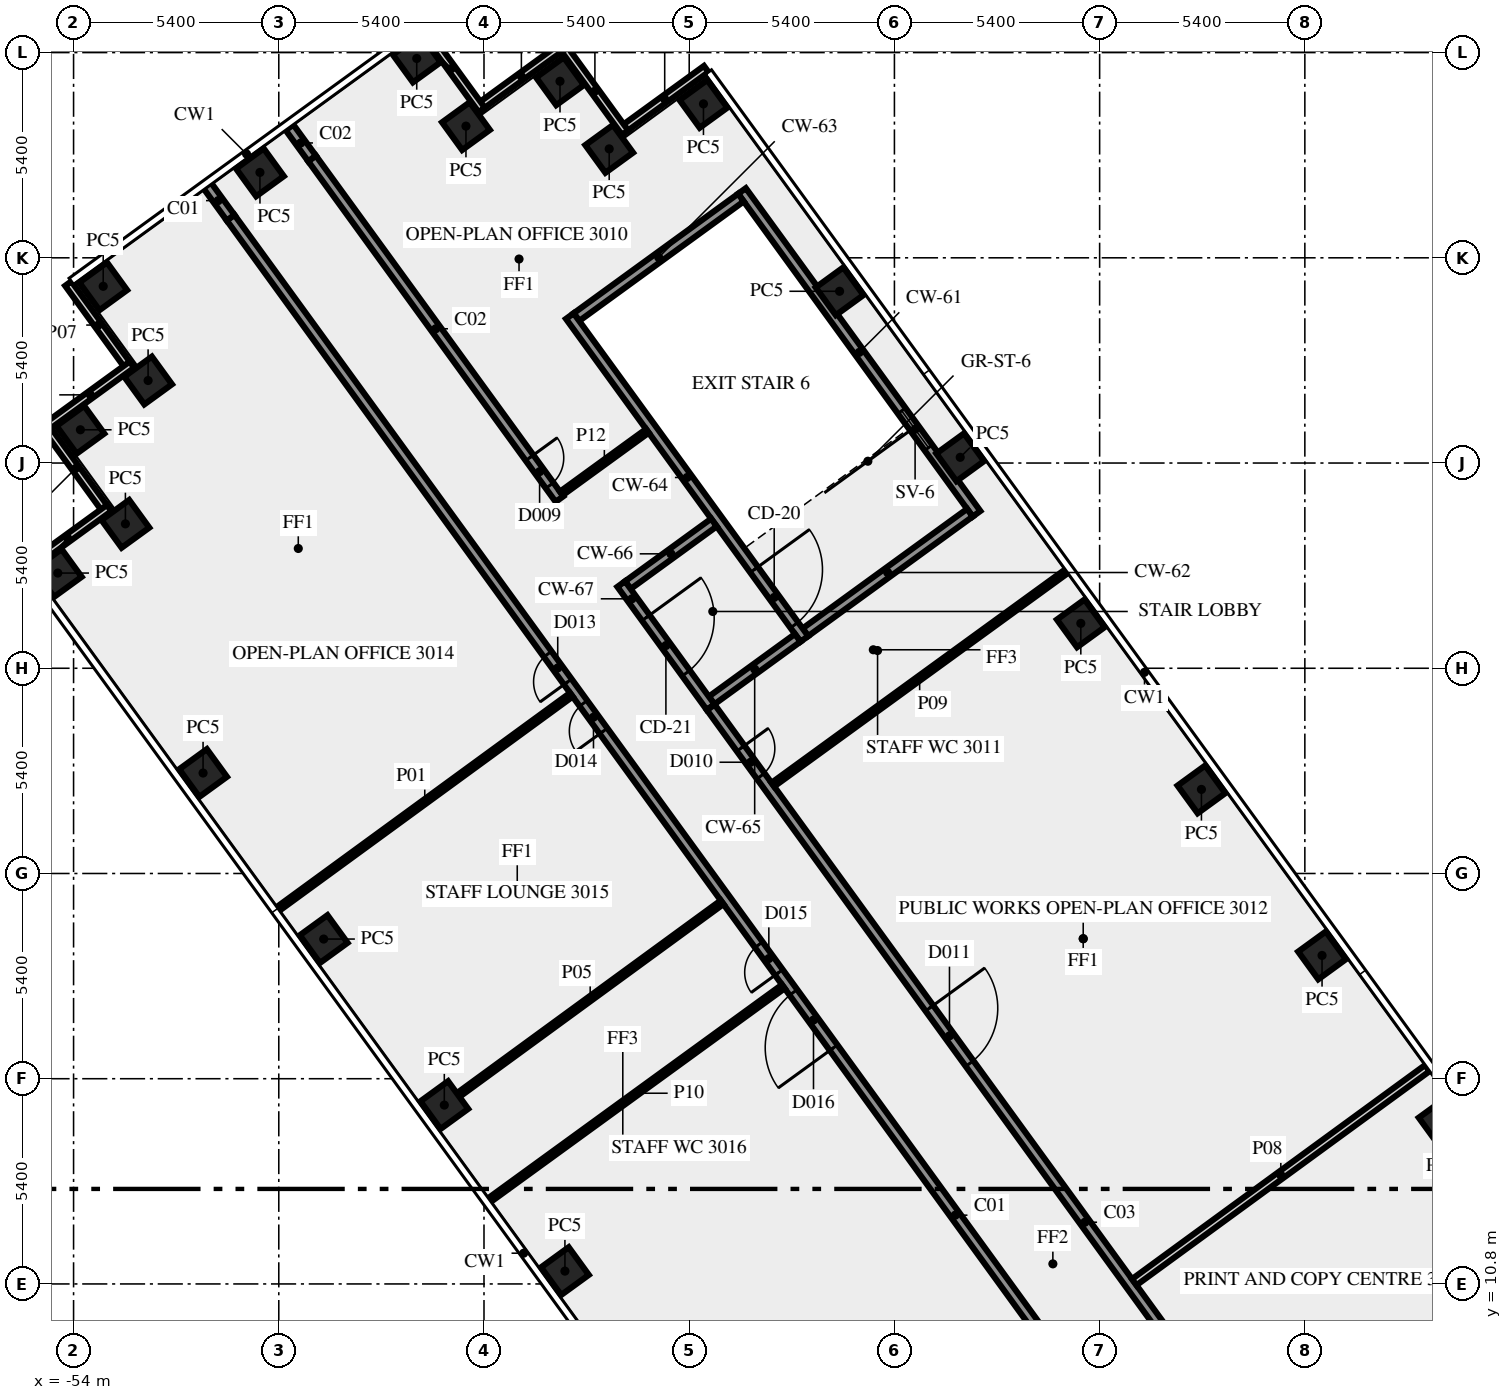
"""IFC4 building model, lengths in metres.
Left out: names, types, materials, properties, quantities, classifications, styles, units other than length and angle.
Written with IfcOpenShell. Run it as: python <this file> out.ifc"""

import sys

from ifc_helpers import new_model, si_unit, direction, frame, frame_2d, origin, origin_2d, place, context, subcontext, project, spatial, rectangle, extrude, element, fill, save


model = new_model("IFC4")
c1 = context("Model", 3, precision=1e-05, world=origin(), true_north=direction((0.0, 1.0)))
c2 = subcontext(c1, "Body", "Model", "MODEL_VIEW")
j1 = project(units=[si_unit("LENGTHUNIT", "METRE"), si_unit("PLANEANGLEUNIT", "RADIAN")], contexts=[c1])
p1 = place(None, origin())
s1 = spatial("IfcSite", under=j1, at=p1, CompositionType="ELEMENT")
p2 = place(p1, origin())
s2 = spatial("IfcBuilding", under=s1, at=p2, CompositionType="ELEMENT")
p3 = place(p2, frame((0.0, 0.0, 129.0)))
s3 = spatial("IfcBuildingStorey", under=s2, at=p3, CompositionType="ELEMENT", Elevation=129.0)
for number, where, z_axis, x_axis in (
    (1, (-17.974, 15.075, 0.0), (0.0, 0.0, 1.0), (-0.588, 0.809, 0.0)),
    (2, (-21.147, 19.444, 0.0), (0.0, 0.0, 1.0), (-0.588, 0.809, 0.0)),
    (3, (-24.321, 23.812, 0.0), (0.0, 0.0, 1.0), (-0.588, 0.809, 0.0)),
    (4, (-27.495, 28.181, 0.0), (0.0, 0.0, 1.0), (-0.588, 0.809, 0.0)),
    (5, (-30.669, 32.55, 0.0), (0.0, 0.0, 1.0), (-0.588, 0.809, 0.0)),
    (6, (-33.843, 36.919, 0.0), (0.0, 0.0, 1.0), (-0.588, 0.809, 0.0)),
    (7, (-37.425, 41.85, 0.0), (0.0, 0.0, 1.0), (-0.588, 0.809, 0.0)),
    (8, (-39.906, 40.666, 0.0), (0.0, 0.0, 1.0), (-0.588, 0.809, 0.0)),
    (9, (-41.2, 42.445, 0.0), (0.0, 0.0, 1.0), (-0.588, 0.809, 0.0)),
    (10, (-43.675, 41.265, 0.0), (0.0, 0.0, 1.0), (-0.809, -0.588, 0.0)),
    (11, (-44.97, 43.045, 0.0), (0.0, 0.0, 1.0), (-0.809, -0.588, 0.0)),
    (12, (-49.096, 40.047, 0.0), (0.0, 0.0, 1.0), (-0.809, -0.588, 0.0)),
    (13, (-53.22, 37.05, 0.0), (0.0, 0.0, 1.0), (0.588, -0.809, 0.0)),
    (14, (-52.039, 34.571, 0.0), (0.0, 0.0, 1.0), (-0.809, -0.588, 0.0)),
    (15, (-53.82, 33.275, 0.0), (0.0, 0.0, 1.0), (0.588, -0.809, 0.0)),
    (16, (-52.636, 30.8, 0.0), (0.0, 0.0, 1.0), (-0.809, -0.588, 0.0)),
    (17, (-54.415, 29.505, 0.0), (0.0, 0.0, 1.0), (0.588, -0.809, 0.0)),
    (18, (-50.592, 24.243, 0.0), (0.0, 0.0, 1.0), (0.588, -0.809, 0.0)),
    (19, (-47.418, 19.875, 0.0), (0.0, 0.0, 1.0), (0.588, -0.809, 0.0)),
    (20, (-44.244, 15.506, 0.0), (0.0, 0.0, 1.0), (0.588, -0.809, 0.0)),
    (21, (-41.07, 11.137, 0.0), (0.0, 0.0, 1.0), (0.588, -0.809, 0.0)),
):
    element("IfcColumn", number, at=place(p3, frame(where, z_axis=z_axis, x_axis=x_axis)), inside=s3, PredefinedType="COLUMN", context=c2, shape_type="SweptSolid", body=[
        extrude(rectangle(XDim=0.9, YDim=0.9, at=origin_2d()), origin(), (0.0, 0.0, 1.0), 3.4),
    ])
p4 = place(p3, frame((-37.353, 42.768, 0.0), z_axis=(0.0, 0.0, 1.0), x_axis=(-0.809033161865, -0.587762999008, 0.0)))
e22 = element("IfcWall", 22, at=p4, inside=s3, PredefinedType="SOLIDWALL", context=c2, shape_type="SweptSolid", body=[
    extrude(rectangle(XDim=2.7, YDim=0.2, at=frame_2d((1.35, 0.0))), origin(), (0.0, 0.0, 1.0), 3.4),
])
p5 = place(p3, frame((-39.488, 41.094, 0.0), z_axis=(0.0, 0.0, 1.0), x_axis=(-0.587806000234, 0.809001919707, 0.0)))
e23 = element("IfcWall", 23, at=p5, inside=s3, PredefinedType="SOLIDWALL", context=c2, shape_type="SweptSolid", body=[
    extrude(rectangle(XDim=2.7, YDim=0.2, at=frame_2d((1.35, 0.0))), origin(), (0.0, 0.0, 1.0), 3.4),
])
for number, where, z_axis, x_axis in (
    (24, (-41.124, 43.366, 0.0), (0.0, 0.0, 1.0), (-0.809, -0.588, 0.0)),
    (25, (-43.259, 41.691, 0.0), (0.0, 0.0, 1.0), (-0.588, 0.809, 0.0)),
    (26, (-54.14, 37.123, 0.0), (0.0, 0.0, 1.0), (0.588, -0.809, 0.0)),
    (27, (-52.465, 34.987, 0.0), (0.0, 0.0, 1.0), (-0.809, -0.588, 0.0)),
):
    element("IfcWall", number, at=place(p3, frame(where, z_axis=z_axis, x_axis=x_axis)), inside=s3, PredefinedType="SOLIDWALL", context=c2, shape_type="SweptSolid", body=[
        extrude(rectangle(XDim=2.7, YDim=0.2, at=frame_2d((1.35, 0.0))), origin(), (0.0, 0.0, 1.0), 3.4),
    ])
p6 = place(p3, frame((-54.738, 33.351, 0.0), z_axis=(0.0, 0.0, 1.0), x_axis=(0.587779184282, -0.809021403008, 0.0)))
e28 = element("IfcWall", 28, at=p6, inside=s3, PredefinedType="SOLIDWALL", context=c2, shape_type="SweptSolid", body=[
    extrude(rectangle(XDim=2.7, YDim=0.2, at=frame_2d((1.35, 0.0))), origin(), (0.0, 0.0, 1.0), 3.4),
])
p7 = place(p3, frame((-53.063, 31.216, 0.0), z_axis=(0.0, 0.0, 1.0), x_axis=(-0.809033161865, -0.587762999008, 0.0)))
e29 = element("IfcWall", 29, at=p7, inside=s3, PredefinedType="SOLIDWALL", context=c2, shape_type="SweptSolid", body=[
    extrude(rectangle(XDim=2.7, YDim=0.2, at=frame_2d((1.35, 0.0))), origin(), (0.0, 0.0, 1.0), 3.4),
])
p8 = place(p3, frame((-30.24, 31.064, 0.0), z_axis=(0.0, 0.0, 1.0), x_axis=(-0.587795589702, 0.809009483706, 0.0)))
e30 = element("IfcWall", 30, at=p8, inside=s3, PredefinedType="SHEAR", context=c2, shape_type="SweptSolid", body=[
    extrude(rectangle(XDim=10.5, YDim=0.25, at=frame_2d((5.25, 0.0))), origin(), (0.0, 0.0, 1.0), 3.4),
])
p9 = place(p8, frame((2.15, 0.0, 1.0)))
e31 = element("IfcOpeningElement", 31, at=p9, cuts=e30, PredefinedType="OPENING", context=c2, shape_type="SweptSolid", body=[
    extrude(rectangle(XDim=1.2, YDim=1.2, at=frame_2d((0.6, 0.6))), frame((0.0, 0.135, 0.0), z_axis=(0.0, -1.0, 0.0), x_axis=(1.0, 0.0, 0.0)), (0.0, 0.0, 1.0), 0.27),
])
p10 = place(p3, frame((-30.414, 31.092, 0.0), z_axis=(0.0, 0.0, 1.0), x_axis=(-0.8089984606, -0.587810760999, 0.0)))
e32 = element("IfcWall", 32, at=p10, inside=s3, PredefinedType="SHEAR", context=c2, shape_type="SweptSolid", body=[
    extrude(rectangle(XDim=5.35, YDim=0.25, at=frame_2d((2.675, 0.0))), origin(), (0.0, 0.0, 1.0), 3.4),
])
p11 = place(p3, frame((-36.439, 39.384, 0.0), z_axis=(0.0, 0.0, 1.0), x_axis=(-0.809020161303, -0.587780893365, 0.0)))
e33 = element("IfcWall", 33, at=p11, inside=s3, PredefinedType="SHEAR", context=c2, shape_type="SweptSolid", body=[
    extrude(rectangle(XDim=5.35, YDim=0.25, at=frame_2d((2.675, 0.0))), origin(), (0.0, 0.0, 1.0), 3.4),
])
p12 = place(p3, frame((-40.942, 36.267, 0.0), z_axis=(0.0, 0.0, 1.0), x_axis=(0.587795589702, -0.809009483706, 0.0)))
e34 = element("IfcWall", 34, at=p12, inside=s3, PredefinedType="SHEAR", context=c2, shape_type="SweptSolid", body=[
    extrude(rectangle(XDim=10.5, YDim=0.25, at=frame_2d((5.25, 0.0))), origin(), (0.0, 0.0, 1.0), 3.4),
])
p13 = place(p12, frame((8.25, 0.0, 0.0)))
e35 = element("IfcOpeningElement", 35, at=p13, cuts=e34, PredefinedType="OPENING", context=c2, shape_type="SweptSolid", body=[
    extrude(rectangle(XDim=1.8, YDim=2.1, at=frame_2d((0.9, 1.05))), frame((0.0, 0.135, 0.0), z_axis=(0.0, -1.0, 0.0), x_axis=(1.0, 0.0, 0.0)), (0.0, 0.0, 1.0), 0.27),
])
for number, where, z_axis, x_axis in (
    (36, (-34.945, 27.8, 0.0), (0.0, 0.0, 1.0), (-0.809, -0.588, 0.0)),
    (37, (-37.149, 30.834, 0.0), (0.0, 0.0, 1.0), (-0.809, -0.588, 0.0)),
):
    element("IfcWall", number, at=place(p3, frame(where, z_axis=z_axis, x_axis=x_axis)), inside=s3, PredefinedType="SHEAR", context=c2, shape_type="SweptSolid", body=[
        extrude(rectangle(XDim=2.8, YDim=0.25, at=frame_2d((1.4, 0.0))), origin(), (0.0, 0.0, 1.0), 3.4),
    ])
p14 = place(p3, frame((-39.589, 29.216, 0.0), z_axis=(0.0, 0.0, 1.0), x_axis=(0.587772420479, -0.809026317077, 0.0)))
e38 = element("IfcWall", 38, at=p14, inside=s3, PredefinedType="SHEAR", context=c2, shape_type="SweptSolid", body=[
    extrude(rectangle(XDim=4.0, YDim=0.25, at=frame_2d((2.0, 0.0))), origin(), (0.0, 0.0, 1.0), 3.4),
])
p15 = place(p14, frame((1.1, 0.0, 0.0)))
e39 = element("IfcOpeningElement", 39, at=p15, cuts=e38, PredefinedType="OPENING", context=c2, shape_type="SweptSolid", body=[
    extrude(rectangle(XDim=1.8, YDim=2.1, at=frame_2d((0.9, 1.05))), frame((0.0, 0.135, 0.0), z_axis=(0.0, -1.0, 0.0), x_axis=(1.0, 0.0, 0.0)), (0.0, 0.0, 1.0), 0.27),
])
p16 = place(p3, frame((-20.531, -1.523, 0.0), z_axis=(0.0, 0.0, 1.0), x_axis=(-0.587784522481, 0.809017524614, 0.0)))
e40 = element("IfcWall", 40, at=p16, inside=s3, PredefinedType="SOLIDWALL", context=c2, shape_type="SweptSolid", body=[
    extrude(rectangle(XDim=49.912, YDim=0.25, at=frame_2d((24.956, 0.0))), origin(), (0.0, 0.0, 1.0), 3.4),
])
p17 = place(p16, frame((34.816, 0.0, 0.0)))
e41 = element("IfcOpeningElement", 41, at=p17, cuts=e40, PredefinedType="OPENING", context=c2, shape_type="SweptSolid", body=[
    extrude(rectangle(XDim=0.9, YDim=2.1, at=frame_2d((0.45, 1.05))), frame((0.0, 0.135, 0.0), z_axis=(0.0, -1.0, 0.0), x_axis=(1.0, 0.0, 0.0)), (0.0, 0.0, 1.0), 0.27),
])
p18 = place(p16, frame((33.215, 0.0, 0.0)))
e42 = element("IfcOpeningElement", 42, at=p18, cuts=e40, PredefinedType="OPENING", context=c2, shape_type="SweptSolid", body=[
    extrude(rectangle(XDim=0.9, YDim=2.1, at=frame_2d((0.45, 1.05))), frame((0.0, 0.135, 0.0), z_axis=(0.0, -1.0, 0.0), x_axis=(1.0, 0.0, 0.0)), (0.0, 0.0, 1.0), 0.27),
])
p19 = place(p16, frame((22.916, 0.0, 0.0)))
e43 = element("IfcOpeningElement", 43, at=p19, cuts=e40, PredefinedType="OPENING", context=c2, shape_type="SweptSolid", body=[
    extrude(rectangle(XDim=1.8, YDim=2.1, at=frame_2d((0.9, 1.05))), frame((0.0, 0.135, 0.0), z_axis=(0.0, -1.0, 0.0), x_axis=(1.0, 0.0, 0.0)), (0.0, 0.0, 1.0), 0.27),
])
p20 = place(p16, frame((0.483, 0.0, 0.0)))
e44 = element("IfcOpeningElement", 44, at=p20, cuts=e40, PredefinedType="OPENING", context=c2, shape_type="SweptSolid", body=[
    extrude(rectangle(XDim=1.8, YDim=2.1, at=frame_2d((0.9, 1.05))), frame((0.0, 0.135, 0.0), z_axis=(0.0, -1.0, 0.0), x_axis=(1.0, 0.0, 0.0)), (0.0, 0.0, 1.0), 0.27),
])
p21 = place(p16, frame((25.365, 0.0, 0.0)))
e45 = element("IfcOpeningElement", 45, at=p21, cuts=e40, PredefinedType="OPENING", context=c2, shape_type="SweptSolid", body=[
    extrude(rectangle(XDim=0.9, YDim=2.1, at=frame_2d((0.45, 1.05))), frame((0.0, 0.135, 0.0), z_axis=(0.0, -1.0, 0.0), x_axis=(1.0, 0.0, 0.0)), (0.0, 0.0, 1.0), 0.27),
])
p22 = place(p3, frame((-47.725, 40.414, 0.0), z_axis=(0.0, 0.0, 1.0), x_axis=(0.587773291021, -0.809025684612, 0.0)))
e46 = element("IfcWall", 46, at=p22, inside=s3, PredefinedType="SOLIDWALL", context=c2, shape_type="SweptSolid", body=[
    extrude(rectangle(XDim=11.079, YDim=0.25, at=frame_2d((5.539, 0.0))), origin(), (0.0, 0.0, 1.0), 3.4),
])
p23 = place(p22, frame((9.737, 0.0, 0.0)))
e47 = element("IfcOpeningElement", 47, at=p23, cuts=e46, PredefinedType="OPENING", context=c2, shape_type="SweptSolid", body=[
    extrude(rectangle(XDim=0.9, YDim=2.1, at=frame_2d((0.45, 1.05))), frame((0.0, 0.135, 0.0), z_axis=(0.0, -1.0, 0.0), x_axis=(1.0, 0.0, 0.0)), (0.0, 0.0, 1.0), 0.27),
])
p24 = place(p3, frame((-37.232, 25.972, 0.0), z_axis=(0.0, 0.0, 1.0), x_axis=(0.587786323093, -0.809016216391, 0.0)))
e48 = element("IfcWall", 48, at=p24, inside=s3, PredefinedType="SOLIDWALL", context=c2, shape_type="SweptSolid", body=[
    extrude(rectangle(XDim=33.493, YDim=0.25, at=frame_2d((16.747, 0.0))), origin(), (0.0, 0.0, 1.0), 3.4),
])
p25 = place(p24, frame((9.785, 0.0, 0.0)))
e49 = element("IfcOpeningElement", 49, at=p25, cuts=e48, PredefinedType="OPENING", context=c2, shape_type="SweptSolid", body=[
    extrude(rectangle(XDim=1.8, YDim=2.1, at=frame_2d((0.9, 1.05))), frame((0.0, 0.135, 0.0), z_axis=(0.0, -1.0, 0.0), x_axis=(1.0, 0.0, 0.0)), (0.0, 0.0, 1.0), 0.27),
])
p26 = place(p24, frame((29.152, 0.0, 0.0)))
e50 = element("IfcOpeningElement", 50, at=p26, cuts=e48, PredefinedType="OPENING", context=c2, shape_type="SweptSolid", body=[
    extrude(rectangle(XDim=0.9, YDim=2.1, at=frame_2d((0.45, 1.05))), frame((0.0, 0.135, 0.0), z_axis=(0.0, -1.0, 0.0), x_axis=(1.0, 0.0, 0.0)), (0.0, 0.0, 1.0), 0.27),
])
p27 = place(p24, frame((1.335, 0.0, 0.0)))
e51 = element("IfcOpeningElement", 51, at=p27, cuts=e48, PredefinedType="OPENING", context=c2, shape_type="SweptSolid", body=[
    extrude(rectangle(XDim=0.9, YDim=2.1, at=frame_2d((0.45, 1.05))), frame((0.0, 0.135, 0.0), z_axis=(0.0, -1.0, 0.0), x_axis=(1.0, 0.0, 0.0)), (0.0, 0.0, 1.0), 0.27),
])
p28 = place(p3, frame((-48.615, 20.671, 0.0), z_axis=(0.0, 0.0, 1.0), x_axis=(0.807691251741, 0.589605666408, 0.0)))
e52 = element("IfcWall", 52, at=p28, inside=s3, PredefinedType="PARTITIONING", context=c2, shape_type="SweptSolid", body=[
    extrude(rectangle(XDim=9.55, YDim=0.12, at=frame_2d((4.775, 0.0))), origin(), (0.0, 0.0, 1.0), 2.5),
])
p29 = place(p3, frame((-43.876, 15.773, 0.0), z_axis=(0.0, 0.0, 1.0), x_axis=(0.807597163234, 0.589734535139, 0.0)))
e53 = element("IfcWall", 53, at=p29, inside=s3, PredefinedType="PARTITIONING", context=c2, shape_type="SweptSolid", body=[
    extrude(rectangle(XDim=8.595, YDim=0.12, at=frame_2d((4.298, 0.0))), origin(), (0.0, 0.0, 1.0), 3.4),
])
p30 = place(p3, frame((-26.089, 10.848, 0.0), z_axis=(0.0, 0.0, 1.0), x_axis=(0.807661302092, 0.589646691759, 0.0)))
e54 = element("IfcWall", 54, at=p30, inside=s3, PredefinedType="SOLIDWALL", context=c2, shape_type="SweptSolid", body=[
    extrude(rectangle(XDim=9.55, YDim=0.2, at=frame_2d((4.775, 0.0))), origin(), (0.0, 0.0, 1.0), 2.5),
])
p31 = place(p3, frame((-27.873, 29.551, 0.0), z_axis=(0.0, 0.0, 1.0), x_axis=(-0.809043311713, -0.587749027879, 0.0)))
e55 = element("IfcWall", 55, at=p31, inside=s3, PredefinedType="PARTITIONING", context=c2, shape_type="SweptSolid", body=[
    extrude(rectangle(XDim=9.55, YDim=0.12, at=frame_2d((4.775, 0.0))), origin(), (0.0, 0.0, 1.0), 2.5),
])
p32 = place(p3, frame((-35.324, 18.625, 0.0), z_axis=(0.0, 0.0, 1.0), x_axis=(-0.808998008689, -0.58781138296, 0.0)))
e56 = element("IfcWall", 56, at=p32, inside=s3, PredefinedType="PARTITIONING", context=c2, shape_type="SweptSolid", body=[
    extrude(rectangle(XDim=9.55, YDim=0.12, at=frame_2d((4.775, 0.0))), origin(), (0.0, 0.0, 1.0), 2.5),
])
p33 = place(p3, frame((-41.166, 31.599, 0.0), z_axis=(0.0, 0.0, 1.0), x_axis=(0.809090262332, 0.587684394381, 0.0)))
e57 = element("IfcWall", 57, at=p33, inside=s3, PredefinedType="PARTITIONING", context=c2, shape_type="SweptSolid", body=[
    extrude(rectangle(XDim=2.801, YDim=0.12, at=frame_2d((1.4, 0.0))), origin(), (0.0, 0.0, 1.0), 3.4),
])
p34 = place(p3, frame((-49.869, 38.856, 0.0), z_axis=(0.0, 0.0, 1.0), x_axis=(-0.587674273289, 0.809097613712, 0.0)))
e58 = element("IfcWall", 58, at=p34, inside=s3, PredefinedType="SOLIDWALL", context=c2, shape_type="SweptSolid", body=[
    extrude(rectangle(XDim=1.109, YDim=0.25, at=frame_2d((0.555, 0.0))), origin(), (0.0, 0.0, 1.0), 2.5),
])
p35 = place(p3, frame((-47.725, 40.414, 0.0), z_axis=(0.0, 0.0, 1.0), x_axis=(-0.587840411638, 0.808976915892, 0.0)))
e59 = element("IfcWall", 59, at=p35, inside=s3, PredefinedType="SOLIDWALL", context=c2, shape_type="SweptSolid", body=[
    extrude(rectangle(XDim=1.008, YDim=0.25, at=frame_2d((0.504, 0.0))), origin(), (0.0, 0.0, 1.0), 2.5),
])
p36 = place(p9, origin())
e60 = element("IfcWindow", 60, at=p36, inside=s3, PartitioningType="SINGLE_PANEL", PredefinedType="WINDOW", context=c2, shape_type="SweptSolid", body=[
    extrude(rectangle(XDim=1.2, YDim=1.2, at=frame_2d((0.6, 0.6))), frame((0.0, 0.03, 0.0), z_axis=(0.0, -1.0, 0.0), x_axis=(1.0, 0.0, 0.0)), (0.0, 0.0, 1.0), 0.06),
])
fill(e31, e60)
p37 = place(p13, origin())
e61 = element("IfcDoor", 61, at=p37, inside=s3, OperationType="DOUBLE_DOOR_SINGLE_SWING", PredefinedType="DOOR", context=c2, shape_type="SweptSolid", body=[
    extrude(rectangle(XDim=1.8, YDim=2.1, at=frame_2d((0.9, 1.05))), frame((0.0, 0.025, 0.0), z_axis=(0.0, -1.0, 0.0), x_axis=(1.0, 0.0, 0.0)), (0.0, 0.0, 1.0), 0.05),
])
fill(e35, e61)
p38 = place(p15, origin())
e62 = element("IfcDoor", 62, at=p38, inside=s3, OperationType="DOUBLE_DOOR_SINGLE_SWING", PredefinedType="DOOR", context=c2, shape_type="SweptSolid", body=[
    extrude(rectangle(XDim=1.8, YDim=2.1, at=frame_2d((0.9, 1.05))), frame((0.0, 0.025, 0.0), z_axis=(0.0, -1.0, 0.0), x_axis=(1.0, 0.0, 0.0)), (0.0, 0.0, 1.0), 0.05),
])
fill(e39, e62)
p39 = place(p23, origin())
e63 = element("IfcDoor", 63, at=p39, inside=s3, OperationType="SINGLE_SWING_RIGHT", PredefinedType="DOOR", context=c2, shape_type="SweptSolid", body=[
    extrude(rectangle(XDim=0.9, YDim=2.1, at=frame_2d((0.45, 1.05))), frame((0.0, 0.025, 0.0), z_axis=(0.0, -1.0, 0.0), x_axis=(1.0, 0.0, 0.0)), (0.0, 0.0, 1.0), 0.05),
])
fill(e47, e63)
p40 = place(p17, origin())
e64 = element("IfcDoor", 64, at=p40, inside=s3, OperationType="SINGLE_SWING_LEFT", PredefinedType="DOOR", context=c2, shape_type="SweptSolid", body=[
    extrude(rectangle(XDim=0.9, YDim=2.1, at=frame_2d((0.45, 1.05))), frame((0.0, 0.025, 0.0), z_axis=(0.0, -1.0, 0.0), x_axis=(1.0, 0.0, 0.0)), (0.0, 0.0, 1.0), 0.05),
])
fill(e41, e64)
p41 = place(p18, origin())
e65 = element("IfcDoor", 65, at=p41, inside=s3, OperationType="SINGLE_SWING_RIGHT", PredefinedType="DOOR", context=c2, shape_type="SweptSolid", body=[
    extrude(rectangle(XDim=0.9, YDim=2.1, at=frame_2d((0.45, 1.05))), frame((0.0, 0.025, 0.0), z_axis=(0.0, -1.0, 0.0), x_axis=(1.0, 0.0, 0.0)), (0.0, 0.0, 1.0), 0.05),
])
fill(e42, e65)
p42 = place(p25, origin())
e66 = element("IfcDoor", 66, at=p42, inside=s3, OperationType="DOUBLE_DOOR_SINGLE_SWING", PredefinedType="DOOR", context=c2, shape_type="SweptSolid", body=[
    extrude(rectangle(XDim=1.8, YDim=2.1, at=frame_2d((0.9, 1.05))), frame((0.0, 0.025, 0.0), z_axis=(0.0, -1.0, 0.0), x_axis=(1.0, 0.0, 0.0)), (0.0, 0.0, 1.0), 0.05),
])
fill(e49, e66)
p43 = place(p19, origin())
e67 = element("IfcDoor", 67, at=p43, inside=s3, OperationType="DOUBLE_DOOR_SINGLE_SWING", PredefinedType="DOOR", context=c2, shape_type="SweptSolid", body=[
    extrude(rectangle(XDim=1.8, YDim=2.1, at=frame_2d((0.9, 1.05))), frame((0.0, 0.025, 0.0), z_axis=(0.0, -1.0, 0.0), x_axis=(1.0, 0.0, 0.0)), (0.0, 0.0, 1.0), 0.05),
])
fill(e43, e67)
p44 = place(p27, origin())
e68 = element("IfcDoor", 68, at=p44, inside=s3, OperationType="SINGLE_SWING_RIGHT", PredefinedType="DOOR", context=c2, shape_type="SweptSolid", body=[
    extrude(rectangle(XDim=0.9, YDim=2.1, at=frame_2d((0.45, 1.05))), frame((0.0, 0.025, 0.0), z_axis=(0.0, -1.0, 0.0), x_axis=(1.0, 0.0, 0.0)), (0.0, 0.0, 1.0), 0.05),
])
fill(e51, e68)
p45 = place(p21, origin())
e69 = element("IfcDoor", 69, at=p45, inside=s3, OperationType="SINGLE_SWING_LEFT", PredefinedType="DOOR", context=c2, shape_type="SweptSolid", body=[
    extrude(rectangle(XDim=0.9, YDim=2.1, at=frame_2d((0.45, 1.05))), frame((0.0, 0.025, 0.0), z_axis=(0.0, -1.0, 0.0), x_axis=(1.0, 0.0, 0.0)), (0.0, 0.0, 1.0), 0.05),
])
fill(e45, e69)
save(model, sys.argv[1])
